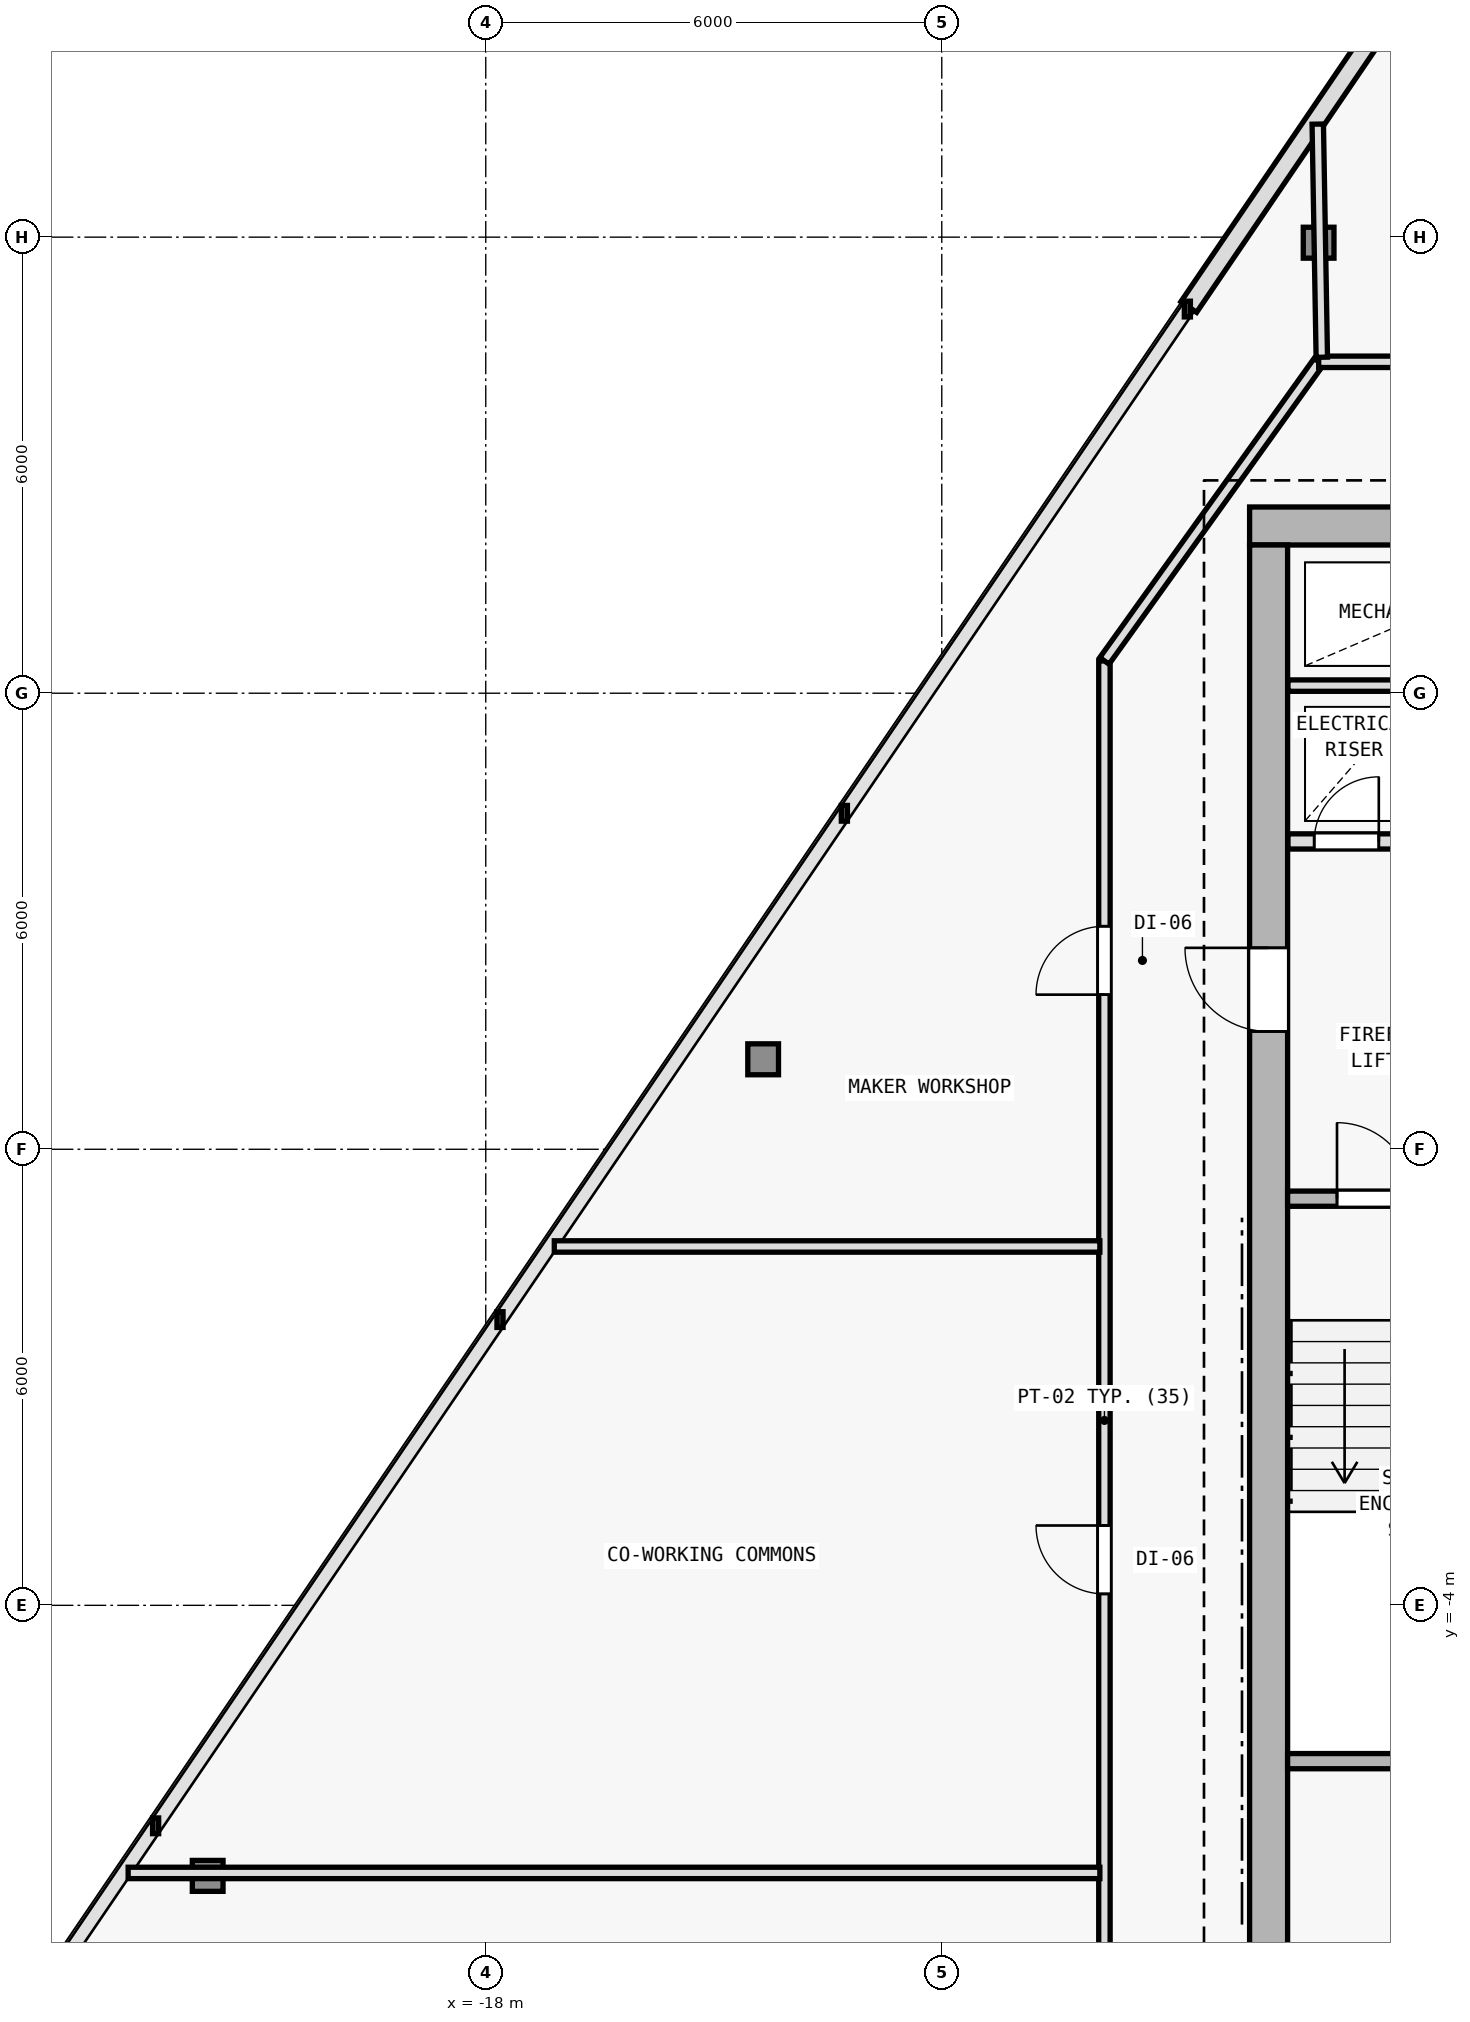
"""IFC4 building model, lengths in metres.
Left out: names, types, materials, properties, quantities, classifications, styles, units other than length and angle.
Written with IfcOpenShell. Run it as: python <this file> out.ifc"""

import sys

from ifc_helpers import new_model, si_unit, direction, frame, frame_2d, origin, origin_2d, place, context, subcontext, project, spatial, rectangle, i_section, extrude, element, fill, save


model = new_model("IFC4")
c1 = context("Model", 3, precision=1e-05, world=origin(), true_north=direction((0.0, 1.0)))
c2 = subcontext(c1, "Body", "Model", "MODEL_VIEW")
j1 = project(units=[si_unit("LENGTHUNIT", "METRE"), si_unit("PLANEANGLEUNIT", "RADIAN")], contexts=[c1])
p1 = place(None, origin())
s1 = spatial("IfcSite", under=j1, at=p1, CompositionType="ELEMENT")
p2 = place(p1, origin())
s2 = spatial("IfcBuilding", under=s1, at=p2, CompositionType="ELEMENT")
p3 = place(p2, frame((0.0, 0.0, 138.6)))
s3 = spatial("IfcBuildingStorey", under=s2, at=p3, CompositionType="ELEMENT", Elevation=138.6)
for number, where, z_axis, x_axis in (
    (1, (-7.7, 10.2, 0.0), (0.0, 0.0, 1.0), (1.0, 0.0, 0.0)),
    (2, (-7.7, 2.0, 0.0), (0.0, 0.0, 1.0), (1.0, 0.0, 0.0)),
):
    element("IfcColumn", number, at=place(p3, frame(where, z_axis=z_axis, x_axis=x_axis)), inside=s3, PredefinedType="COLUMN", context=c2, shape_type="SweptSolid", body=[
        extrude(i_section(OverallWidth=0.404, OverallDepth=0.407, WebThickness=0.017, FlangeThickness=0.028, FilletRadius=0.015, at=origin_2d()), origin(), (0.0, 0.0, 1.0), 3.6),
    ])
p4 = place(p3, frame((-7.042, 13.927, 0.005), z_axis=(0.008774547672, -0.002516730728, 0.999958335822), x_axis=(0.275705143097, 0.961242255662, 0.0)))
e3 = element("IfcColumn", 3, at=p4, inside=s3, PredefinedType="COLUMN", context=c2, shape_type="SweptSolid", body=[
    extrude(i_section(OverallWidth=0.404, OverallDepth=0.407, WebThickness=0.017, FlangeThickness=0.028, FilletRadius=0.015, at=origin_2d()), origin(), (0.0, 0.0, 1.0), 3.589),
])
p5 = place(p3, frame((-14.35, 3.184, 0.005), z_axis=(0.01700241672, 0.009521353363, 0.999810112799), x_axis=(-0.488603368932, 0.87250601595, 0.0)))
e4 = element("IfcColumn", 4, at=p5, inside=s3, PredefinedType="COLUMN", context=c2, shape_type="SweptSolid", body=[
    extrude(i_section(OverallWidth=0.404, OverallDepth=0.407, WebThickness=0.017, FlangeThickness=0.028, FilletRadius=0.015, at=origin_2d()), origin(), (0.0, 0.0, 1.0), 3.59),
])
p6 = place(p3, frame((-21.659, -7.559, 0.005), z_axis=(0.025222449659, 0.021619242565, 0.999448065876), x_axis=(-0.650791373456, 0.759256602365, 0.0)))
e5 = element("IfcColumn", 5, at=p6, inside=s3, PredefinedType="COLUMN", context=c2, shape_type="SweptSolid", body=[
    extrude(i_section(OverallWidth=0.404, OverallDepth=0.407, WebThickness=0.017, FlangeThickness=0.028, FilletRadius=0.015, at=origin_2d()), origin(), (0.0, 0.0, 1.0), 3.591),
])
p7 = place(p3, frame((-8.75, 13.081, 0.0), z_axis=(0.0, 0.0, 1.0), x_axis=(0.562463958751, 0.82682180372, 0.0)))
e6 = element("IfcWall", 6, at=p7, inside=s3, PredefinedType="SOLIDWALL", context=c2, shape_type="SweptSolid", body=[
    extrude(rectangle(XDim=11.322, YDim=0.25, at=frame_2d((5.661, 0.0))), origin(), (0.0, 0.0, 1.0), 3.35),
])
p8 = place(p7, frame((4.911, 0.0, 0.62)))
e7 = element("IfcOpeningElement", 7, at=p8, cuts=e6, PredefinedType="OPENING", context=c2, shape_type="SweptSolid", body=[
    extrude(rectangle(XDim=1.5, YDim=2.0, at=frame_2d((0.75, 1.0))), frame((0.0, 0.135, 0.0), z_axis=(0.0, -1.0, 0.0), x_axis=(1.0, 0.0, 0.0)), (0.0, 0.0, 1.0), 0.27),
])
p9 = place(p3, frame((7.95, 10.2, 0.0), z_axis=(0.0, 0.0, 1.0), x_axis=(-1.0, 0.0, 0.0)))
e8 = element("IfcWall", 8, at=p9, inside=s3, PredefinedType="SHEAR", context=c2, shape_type="SweptSolid", body=[
    extrude(rectangle(XDim=15.9, YDim=0.5, at=frame_2d((7.95, 0.0))), origin(), (0.0, 0.0, 1.0), 3.35),
])
p10 = place(p9, frame((4.4, 0.0, 0.0)))
e9 = element("IfcOpeningElement", 9, at=p10, cuts=e8, PredefinedType="OPENING", context=c2, shape_type="SweptSolid", body=[
    extrude(rectangle(XDim=1.1, YDim=2.15, at=frame_2d((0.55, 1.075))), frame((0.0, 0.26, 0.0), z_axis=(0.0, -1.0, 0.0), x_axis=(1.0, 0.0, 0.0)), (0.0, 0.0, 1.0), 0.52),
])
p11 = place(p3, frame((-7.7, -9.15, 0.0), z_axis=(0.0, 0.0, 1.0), x_axis=(0.0, 1.0, 0.0)))
e10 = element("IfcWall", 10, at=p11, inside=s3, PredefinedType="SHEAR", context=c2, shape_type="SweptSolid", body=[
    extrude(rectangle(XDim=19.1, YDim=0.5, at=frame_2d((9.55, 0.0))), origin(), (0.0, 0.0, 1.0), 3.35),
])
p12 = place(p11, frame((12.7, 0.0, 0.0)))
e11 = element("IfcOpeningElement", 11, at=p12, cuts=e10, PredefinedType="OPENING", context=c2, shape_type="SweptSolid", body=[
    extrude(rectangle(XDim=1.1, YDim=2.15, at=frame_2d((0.55, 1.075))), frame((0.0, 0.26, 0.0), z_axis=(0.0, -1.0, 0.0), x_axis=(1.0, 0.0, 0.0)), (0.0, 0.0, 1.0), 0.52),
])
p13 = place(p3, frame((-7.45, 1.35, 0.0), z_axis=(0.0, 0.0, 1.0), x_axis=(1.0, 0.0, 0.0)))
e12 = element("IfcWall", 12, at=p13, inside=s3, PredefinedType="SOLIDWALL", context=c2, shape_type="SweptSolid", body=[
    extrude(rectangle(XDim=3.4, YDim=0.2, at=frame_2d((1.7, 0.0))), origin(), (0.0, 0.0, 1.0), 3.35),
])
p14 = place(p13, frame((0.65, 0.0, 0.0)))
e13 = element("IfcOpeningElement", 13, at=p14, cuts=e12, PredefinedType="OPENING", context=c2, shape_type="SweptSolid", body=[
    extrude(rectangle(XDim=1.0, YDim=2.15, at=frame_2d((0.5, 1.075))), frame((0.0, 0.11, 0.0), z_axis=(0.0, -1.0, 0.0), x_axis=(1.0, 0.0, 0.0)), (0.0, 0.0, 1.0), 0.22),
])
p15 = place(p3, frame((-7.445, 6.05, 0.0), z_axis=(0.0, 0.0, 1.0), x_axis=(1.0, 0.0, 0.0)))
e14 = element("IfcWall", 14, at=p15, inside=s3, PredefinedType="SOLIDWALL", context=c2, shape_type="SweptSolid", body=[
    extrude(rectangle(XDim=3.595, YDim=0.2, at=frame_2d((1.797, 0.0))), origin(), (0.0, 0.0, 1.0), 3.35),
])
p16 = place(p15, frame((0.345, 0.0, 0.0)))
e15 = element("IfcOpeningElement", 15, at=p16, cuts=e14, PredefinedType="OPENING", context=c2, shape_type="SweptSolid", body=[
    extrude(rectangle(XDim=0.85, YDim=2.1, at=frame_2d((0.425, 1.05))), frame((0.0, 0.11, 0.0), z_axis=(0.0, -1.0, 0.0), x_axis=(1.0, 0.0, 0.0)), (0.0, 0.0, 1.0), 0.22),
])
p17 = place(p15, frame((2.145, 0.0, 0.0)))
e16 = element("IfcOpeningElement", 16, at=p17, cuts=e14, PredefinedType="OPENING", context=c2, shape_type="SweptSolid", body=[
    extrude(rectangle(XDim=0.85, YDim=2.1, at=frame_2d((0.425, 1.05))), frame((0.0, 0.11, 0.0), z_axis=(0.0, -1.0, 0.0), x_axis=(1.0, 0.0, 0.0)), (0.0, 0.0, 1.0), 0.22),
])
p18 = place(p3, frame((-7.445, 8.1, 0.0), z_axis=(0.0, 0.0, 1.0), x_axis=(1.0, 0.0, 0.0)))
e17 = element("IfcWall", 17, at=p18, inside=s3, PredefinedType="PARTITIONING", context=c2, shape_type="SweptSolid", body=[
    extrude(rectangle(XDim=3.595, YDim=0.15, at=frame_2d((1.797, 0.0))), origin(), (0.0, 0.0, 1.0), 3.35),
])
p19 = place(p3, frame((-7.45, -6.05, 0.0), z_axis=(0.0, 0.0, 1.0), x_axis=(1.0, 0.0, 0.0)))
e18 = element("IfcWall", 18, at=p19, inside=s3, PredefinedType="SOLIDWALL", context=c2, shape_type="SweptSolid", body=[
    extrude(rectangle(XDim=3.4, YDim=0.2, at=frame_2d((1.7, 0.0))), origin(), (0.0, 0.0, 1.0), 3.35),
])
p20 = place(p3, frame((-9.86, -11.56, 0.0), z_axis=(0.0, 0.0, 1.0), x_axis=(0.0, 1.0, 0.0)))
e19 = element("IfcWall", 19, at=p20, inside=s3, PredefinedType="PARTITIONING", context=c2, shape_type="SweptSolid", body=[
    extrude(rectangle(XDim=19.986, YDim=0.15, at=frame_2d((9.993, 0.0))), origin(), (0.0, 0.0, 1.0), 2.775),
])
p21 = place(p20, frame((7.71, 0.0, 0.0)))
e20 = element("IfcOpeningElement", 20, at=p21, cuts=e19, PredefinedType="OPENING", context=c2, shape_type="SweptSolid", body=[
    extrude(rectangle(XDim=0.9, YDim=2.1, at=frame_2d((0.45, 1.05))), frame((0.0, 0.085, 0.0), z_axis=(0.0, -1.0, 0.0), x_axis=(1.0, 0.0, 0.0)), (0.0, 0.0, 1.0), 0.17),
])
p22 = place(p20, frame((1.659, 0.0, 0.0)))
e21 = element("IfcOpeningElement", 21, at=p22, cuts=e19, PredefinedType="OPENING", context=c2, shape_type="SweptSolid", body=[
    extrude(rectangle(XDim=0.9, YDim=2.1, at=frame_2d((0.45, 1.05))), frame((0.0, 0.085, 0.0), z_axis=(0.0, -1.0, 0.0), x_axis=(1.0, 0.0, 0.0)), (0.0, 0.0, 1.0), 0.17),
])
p23 = place(p20, frame((15.594, 0.0, 0.0)))
e22 = element("IfcOpeningElement", 22, at=p23, cuts=e19, PredefinedType="OPENING", context=c2, shape_type="SweptSolid", body=[
    extrude(rectangle(XDim=0.9, YDim=2.1, at=frame_2d((0.45, 1.05))), frame((0.0, 0.085, 0.0), z_axis=(0.0, -1.0, 0.0), x_axis=(1.0, 0.0, 0.0)), (0.0, 0.0, 1.0), 0.17),
])
p24 = place(p3, frame((-9.86, 8.426, 0.0), z_axis=(0.0, 0.0, 1.0), x_axis=(0.582449511476, 0.812866881218, 0.0)))
e23 = element("IfcWall", 23, at=p24, inside=s3, PredefinedType="PARTITIONING", context=c2, shape_type="SweptSolid", body=[
    extrude(rectangle(XDim=4.84, YDim=0.15, at=frame_2d((2.42, 0.0))), origin(), (0.0, 0.0, 1.0), 2.965),
])
p25 = place(p3, frame((-7.041, 12.36, 0.0), z_axis=(0.0, 0.0, 1.0), x_axis=(1.0, 0.0, 0.0)))
e24 = element("IfcWall", 24, at=p25, inside=s3, PredefinedType="PARTITIONING", context=c2, shape_type="SweptSolid", body=[
    extrude(rectangle(XDim=14.064, YDim=0.15, at=frame_2d((7.032, 0.0))), origin(), (0.0, 0.0, 1.0), 2.965),
])
p26 = place(p25, frame((12.174, 0.0, 0.0)))
e25 = element("IfcOpeningElement", 25, at=p26, cuts=e24, PredefinedType="OPENING", context=c2, shape_type="SweptSolid", body=[
    extrude(rectangle(XDim=0.9, YDim=2.1, at=frame_2d((0.45, 1.05))), frame((0.0, 0.085, 0.0), z_axis=(0.0, -1.0, 0.0), x_axis=(1.0, 0.0, 0.0)), (0.0, 0.0, 1.0), 0.17),
])
p27 = place(p25, frame((9.225, 0.0, 0.0)))
e26 = element("IfcOpeningElement", 26, at=p27, cuts=e24, PredefinedType="OPENING", context=c2, shape_type="SweptSolid", body=[
    extrude(rectangle(XDim=0.9, YDim=2.1, at=frame_2d((0.45, 1.05))), frame((0.0, 0.085, 0.0), z_axis=(0.0, -1.0, 0.0), x_axis=(1.0, 0.0, 0.0)), (0.0, 0.0, 1.0), 0.17),
])
p28 = place(p25, frame((3.633, 0.0, 0.0)))
e27 = element("IfcOpeningElement", 27, at=p28, cuts=e24, PredefinedType="OPENING", context=c2, shape_type="SweptSolid", body=[
    extrude(rectangle(XDim=0.9, YDim=2.1, at=frame_2d((0.45, 1.05))), frame((0.0, 0.085, 0.0), z_axis=(0.0, -1.0, 0.0), x_axis=(1.0, 0.0, 0.0)), (0.0, 0.0, 1.0), 0.17),
])
p29 = place(p3, frame((-7.0, 12.42, 0.0), z_axis=(0.0, 0.0, 1.0), x_axis=(-0.017268994024, 0.999850879804, 0.0)))
e28 = element("IfcWall", 28, at=p29, inside=s3, PredefinedType="PARTITIONING", context=c2, shape_type="SweptSolid", body=[
    extrude(rectangle(XDim=3.068, YDim=0.15, at=frame_2d((1.534, 0.0))), origin(), (0.0, 0.0, 1.0), 2.885),
])
p30 = place(p3, frame((-9.92, -7.521, 0.0), z_axis=(0.0, 0.0, 1.0), x_axis=(-1.0, 0.0, 0.0)))
e29 = element("IfcWall", 29, at=p30, inside=s3, PredefinedType="PARTITIONING", context=c2, shape_type="SweptSolid", body=[
    extrude(rectangle(XDim=12.785, YDim=0.15, at=frame_2d((6.393, 0.0))), origin(), (0.0, 0.0, 1.0), 2.775),
])
p31 = place(p3, frame((-9.92, 0.721, 0.0), z_axis=(0.0, 0.0, 1.0), x_axis=(-1.0, 0.0, 0.0)))
e30 = element("IfcWall", 30, at=p31, inside=s3, PredefinedType="PARTITIONING", context=c2, shape_type="SweptSolid", body=[
    extrude(rectangle(XDim=7.178, YDim=0.15, at=frame_2d((3.589, 0.0))), origin(), (0.0, 0.0, 1.0), 2.775),
])
p32 = place(p12, origin())
e31 = element("IfcDoor", 31, at=p32, inside=s3, OperationType="SINGLE_SWING_RIGHT", PredefinedType="DOOR", context=c2, shape_type="SweptSolid", body=[
    extrude(rectangle(XDim=1.1, YDim=2.15, at=frame_2d((0.55, 1.075))), frame((0.0, 0.025, 0.0), z_axis=(0.0, -1.0, 0.0), x_axis=(1.0, 0.0, 0.0)), (0.0, 0.0, 1.0), 0.05),
])
fill(e11, e31)
p33 = place(p14, origin())
e32 = element("IfcDoor", 32, at=p33, inside=s3, OperationType="SINGLE_SWING_LEFT", PredefinedType="DOOR", context=c2, shape_type="SweptSolid", body=[
    extrude(rectangle(XDim=1.0, YDim=2.15, at=frame_2d((0.5, 1.075))), frame((0.0, 0.025, 0.0), z_axis=(0.0, -1.0, 0.0), x_axis=(1.0, 0.0, 0.0)), (0.0, 0.0, 1.0), 0.05),
])
fill(e13, e32)
p34 = place(p16, origin())
e33 = element("IfcDoor", 33, at=p34, inside=s3, OperationType="SINGLE_SWING_RIGHT", PredefinedType="DOOR", context=c2, shape_type="SweptSolid", body=[
    extrude(rectangle(XDim=0.85, YDim=2.1, at=frame_2d((0.425, 1.05))), frame((0.0, 0.025, 0.0), z_axis=(0.0, -1.0, 0.0), x_axis=(1.0, 0.0, 0.0)), (0.0, 0.0, 1.0), 0.05),
])
fill(e15, e33)
p35 = place(p21, origin())
e34 = element("IfcDoor", 34, at=p35, inside=s3, OperationType="SINGLE_SWING_RIGHT", PredefinedType="DOOR", context=c2, shape_type="SweptSolid", body=[
    extrude(rectangle(XDim=0.9, YDim=2.1, at=frame_2d((0.45, 1.05))), frame((0.0, 0.025, 0.0), z_axis=(0.0, -1.0, 0.0), x_axis=(1.0, 0.0, 0.0)), (0.0, 0.0, 1.0), 0.05),
])
fill(e20, e34)
p36 = place(p23, origin())
e35 = element("IfcDoor", 35, at=p36, inside=s3, OperationType="SINGLE_SWING_LEFT", PredefinedType="DOOR", context=c2, shape_type="SweptSolid", body=[
    extrude(rectangle(XDim=0.9, YDim=2.1, at=frame_2d((0.45, 1.05))), frame((0.0, 0.025, 0.0), z_axis=(0.0, -1.0, 0.0), x_axis=(1.0, 0.0, 0.0)), (0.0, 0.0, 1.0), 0.05),
])
fill(e22, e35)
save(model, sys.argv[1])
